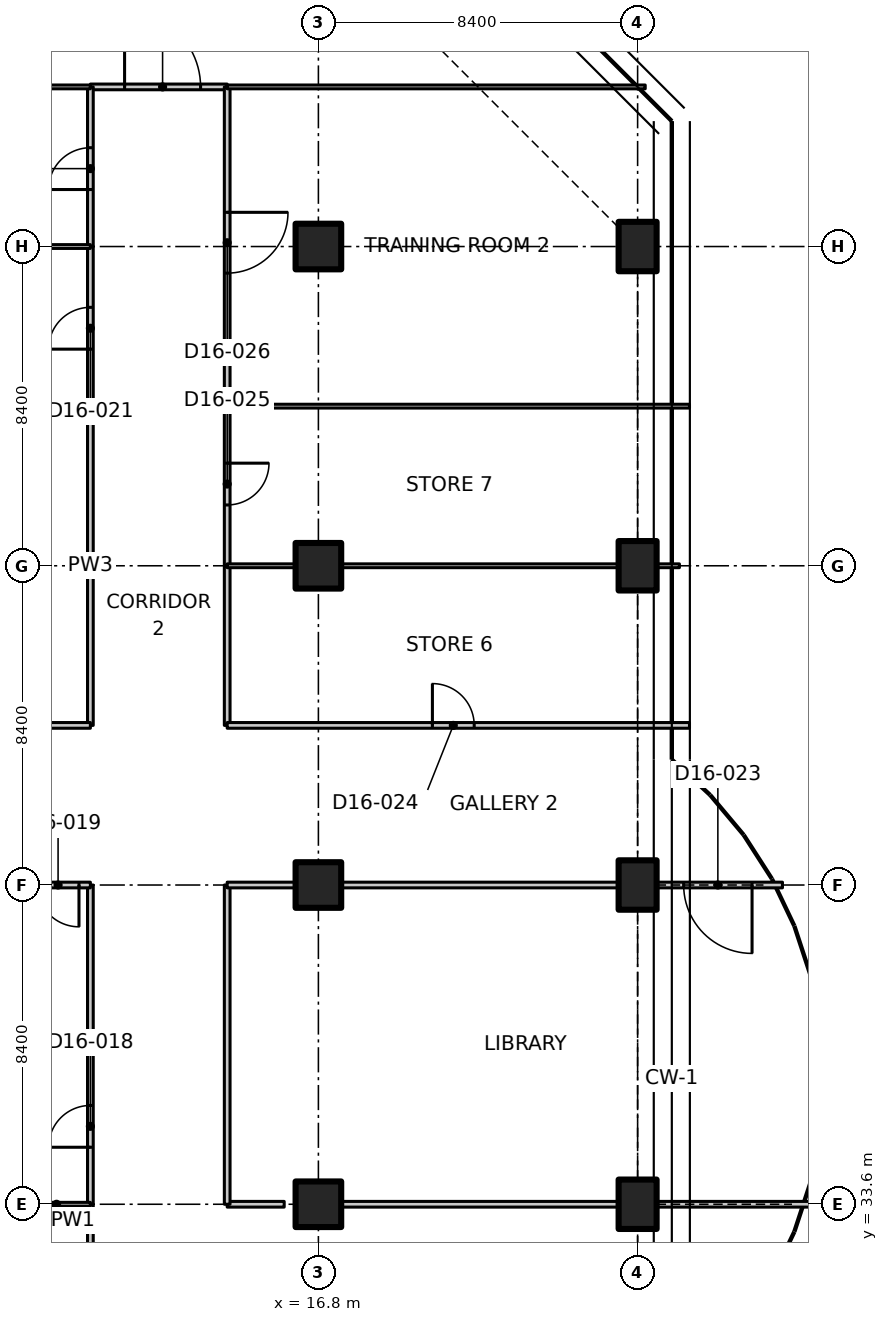
"""IFC4 building model, lengths in metres.
Left out: names, types, materials, properties, quantities, classifications, styles, units other than length and angle.
Written with IfcOpenShell. Run it as: python <this file> out.ifc"""

import sys

from ifc_helpers import new_model, si_unit, direction, frame, frame_2d, origin, origin_2d, place, context, subcontext, project, spatial, polyline, rectangle, outline, extrude, element, fill, save


model = new_model("IFC4")
c1 = context("Model", 3, precision=1e-05, world=origin(), true_north=direction((0.0, 1.0)))
c2 = subcontext(c1, "Body", "Model", "MODEL_VIEW")
j1 = project(units=[si_unit("LENGTHUNIT", "METRE"), si_unit("PLANEANGLEUNIT", "RADIAN")], contexts=[c1])
p1 = place(None, origin())
s1 = spatial("IfcSite", under=j1, at=p1, CompositionType="ELEMENT")
p2 = place(p1, origin())
s2 = spatial("IfcBuilding", under=s1, at=p2, CompositionType="ELEMENT")
p3 = place(p2, frame((0.0, 0.0, 127.7)))
s3 = spatial("IfcBuildingStorey", under=s2, at=p3, CompositionType="ELEMENT", Elevation=127.7)
for number, where, z_axis, x_axis in (
    (1, (16.8, 33.6, 0.0), (0.0, 0.0, 1.0), (1.0, 0.0, 0.0)),
    (2, (16.8, 42.0, 0.0), (0.0, 0.0, 1.0), (1.0, 0.0, 0.0)),
    (3, (16.8, 50.4, 0.0), (0.0, 0.0, 1.0), (1.0, 0.0, 0.0)),
    (4, (16.8, 58.8, 0.0), (0.0, 0.0, 1.0), (1.0, 0.0, 0.0)),
):
    element("IfcColumn", number, at=place(p3, frame(where, z_axis=z_axis, x_axis=x_axis)), inside=s3, PredefinedType="COLUMN", context=c2, shape_type="SweptSolid", body=[
        extrude(rectangle(XDim=1.2, YDim=1.2, at=origin_2d()), origin(), (0.0, 0.0, 1.0), 3.35),
    ])
for number, where, z_axis, x_axis in (
    (5, (25.2, 33.6, 0.0), (0.0, 0.0, 1.0), (1.0, 0.0, 0.0)),
    (6, (25.2, 42.0, 0.0), (0.0, 0.0, 1.0), (1.0, 0.0, 0.0)),
    (7, (25.2, 50.4, 0.0), (0.0, 0.0, 1.0), (1.0, 0.0, 0.0)),
    (8, (25.2, 58.8, 0.0), (0.0, 0.0, 1.0), (1.0, 0.0, 0.0)),
):
    element("IfcColumn", number, at=place(p3, frame(where, z_axis=z_axis, x_axis=x_axis)), inside=s3, PredefinedType="COLUMN", context=c2, shape_type="SweptSolid", body=[
        extrude(rectangle(XDim=1.0, YDim=1.3, at=origin_2d()), origin(), (0.0, 0.0, 1.0), 3.35),
    ])
p4 = place(p3, frame((10.8, 25.2, 0.0), z_axis=(0.0, 0.0, 1.0), x_axis=(0.0, 1.0, 0.0)))
e9 = element("IfcWall", 9, at=p4, inside=s3, PredefinedType="PARTITIONING", context=c2, shape_type="SweptSolid", body=[
    extrude(rectangle(XDim=8.4, YDim=0.15, at=frame_2d((4.2, 0.0))), origin(), (0.0, 0.0, 1.0), 3.33),
])
p5 = place(p4, frame((3.3, 0.0, 0.0)))
e10 = element("IfcOpeningElement", 10, at=p5, cuts=e9, PredefinedType="OPENING", context=c2, shape_type="SweptSolid", body=[
    extrude(rectangle(XDim=1.6, YDim=2.1, at=frame_2d((0.8, 1.05))), frame((0.0, 0.085, 0.0), z_axis=(0.0, -1.0, 0.0), x_axis=(1.0, 0.0, 0.0)), (0.0, 0.0, 1.0), 0.17),
])
p6 = place(p3, frame((14.4, 33.6, 0.0), z_axis=(0.0, 0.0, 1.0), x_axis=(1.0, 0.0, 0.0)))
e11 = element("IfcWall", 11, at=p6, inside=s3, PredefinedType="PARTITIONING", context=c2, shape_type="SweptSolid", body=[
    extrude(rectangle(XDim=1.5, YDim=0.15, at=frame_2d((0.75, 0.0))), origin(), (0.0, 0.0, 1.0), 3.33),
])
p7 = place(p3, frame((17.42, 33.6, 0.0), z_axis=(0.0, 0.0, 1.0), x_axis=(1.0, 0.0, 0.0)))
e12 = element("IfcWall", 12, at=p7, inside=s3, PredefinedType="PARTITIONING", context=c2, shape_type="SweptSolid", body=[
    extrude(rectangle(XDim=7.26, YDim=0.15, at=frame_2d((3.63, 0.0))), origin(), (0.0, 0.0, 1.0), 3.33),
])
p8 = place(p3, frame((25.72, 33.6, 0.0), z_axis=(0.0, 0.0, 1.0), x_axis=(1.0, 0.0, 0.0)))
e13 = element("IfcWall", 13, at=p8, inside=s3, PredefinedType="PARTITIONING", context=c2, shape_type="SweptSolid", body=[
    extrude(rectangle(XDim=4.268, YDim=0.15, at=frame_2d((2.134, 0.0))), origin(), (0.0, 0.0, 1.0), 2.98),
])
p9 = place(p3, frame((10.8, 63.0, 0.0), z_axis=(0.0, 0.0, 1.0), x_axis=(1.0, 0.0, 0.0)))
e14 = element("IfcWall", 14, at=p9, inside=s3, PredefinedType="PARTITIONING", context=c2, shape_type="SweptSolid", body=[
    extrude(rectangle(XDim=3.6, YDim=0.15, at=frame_2d((1.8, 0.0))), origin(), (0.0, 0.0, 1.0), 3.33),
])
p10 = place(p9, frame((0.9, 0.0, 0.0)))
e15 = element("IfcOpeningElement", 15, at=p10, cuts=e14, PredefinedType="OPENING", context=c2, shape_type="SweptSolid", body=[
    extrude(rectangle(XDim=2.0, YDim=2.4, at=frame_2d((1.0, 1.2))), frame((0.0, 0.085, 0.0), z_axis=(0.0, -1.0, 0.0), x_axis=(1.0, 0.0, 0.0)), (0.0, 0.0, 1.0), 0.17),
])
p11 = place(p3, frame((10.8, 33.6, 0.0), z_axis=(0.0, 0.0, 1.0), x_axis=(0.0, 1.0, 0.0)))
e16 = element("IfcWall", 16, at=p11, inside=s3, PredefinedType="PARTITIONING", context=c2, shape_type="SweptSolid", body=[
    extrude(rectangle(XDim=4.2, YDim=0.15, at=frame_2d((2.1, 0.0))), origin(), (0.0, 0.0, 1.0), 3.33),
])
p12 = place(p11, frame((1.5, 0.0, 0.0)))
e17 = element("IfcOpeningElement", 17, at=p12, cuts=e16, PredefinedType="OPENING", context=c2, shape_type="SweptSolid", body=[
    extrude(rectangle(XDim=1.1, YDim=2.1, at=frame_2d((0.55, 1.05))), frame((0.0, 0.085, 0.0), z_axis=(0.0, -1.0, 0.0), x_axis=(1.0, 0.0, 0.0)), (0.0, 0.0, 1.0), 0.17),
])
p13 = place(p3, frame((10.8, 37.8, 0.0), z_axis=(0.0, 0.0, 1.0), x_axis=(0.0, 1.0, 0.0)))
e18 = element("IfcWall", 18, at=p13, inside=s3, PredefinedType="PARTITIONING", context=c2, shape_type="SweptSolid", body=[
    extrude(rectangle(XDim=4.2, YDim=0.15, at=frame_2d((2.1, 0.0))), origin(), (0.0, 0.0, 1.0), 3.33),
])
p14 = place(p3, frame((10.8, 46.2, 0.0), z_axis=(0.0, 0.0, 1.0), x_axis=(0.0, 1.0, 0.0)))
e19 = element("IfcWall", 19, at=p14, inside=s3, PredefinedType="PARTITIONING", context=c2, shape_type="SweptSolid", body=[
    extrude(rectangle(XDim=8.4, YDim=0.15, at=frame_2d((4.2, 0.0))), origin(), (0.0, 0.0, 1.0), 3.33),
])
p15 = place(p3, frame((10.8, 54.6, 0.0), z_axis=(0.0, 0.0, 1.0), x_axis=(0.0, 1.0, 0.0)))
e20 = element("IfcWall", 20, at=p15, inside=s3, PredefinedType="PARTITIONING", context=c2, shape_type="SweptSolid", body=[
    extrude(rectangle(XDim=4.2, YDim=0.15, at=frame_2d((2.1, 0.0))), origin(), (0.0, 0.0, 1.0), 3.33),
])
p16 = place(p15, frame((1.5, 0.0, 0.0)))
e21 = element("IfcOpeningElement", 21, at=p16, cuts=e20, PredefinedType="OPENING", context=c2, shape_type="SweptSolid", body=[
    extrude(rectangle(XDim=1.1, YDim=2.1, at=frame_2d((0.55, 1.05))), frame((0.0, 0.085, 0.0), z_axis=(0.0, -1.0, 0.0), x_axis=(1.0, 0.0, 0.0)), (0.0, 0.0, 1.0), 0.17),
])
p17 = place(p3, frame((10.8, 58.8, 0.0), z_axis=(0.0, 0.0, 1.0), x_axis=(0.0, 1.0, 0.0)))
e22 = element("IfcWall", 22, at=p17, inside=s3, PredefinedType="PARTITIONING", context=c2, shape_type="SweptSolid", body=[
    extrude(rectangle(XDim=4.2, YDim=0.15, at=frame_2d((2.1, 0.0))), origin(), (0.0, 0.0, 1.0), 3.33),
])
p18 = place(p17, frame((1.5, 0.0, 0.0)))
e23 = element("IfcOpeningElement", 23, at=p18, cuts=e22, PredefinedType="OPENING", context=c2, shape_type="SweptSolid", body=[
    extrude(rectangle(XDim=1.1, YDim=2.1, at=frame_2d((0.55, 1.05))), frame((0.0, 0.085, 0.0), z_axis=(0.0, -1.0, 0.0), x_axis=(1.0, 0.0, 0.0)), (0.0, 0.0, 1.0), 0.17),
])
p19 = place(p3, frame((14.4, 42.0, 0.0), z_axis=(0.0, 0.0, 1.0), x_axis=(0.0, -1.0, 0.0)))
e24 = element("IfcWall", 24, at=p19, inside=s3, PredefinedType="PARTITIONING", context=c2, shape_type="SweptSolid", body=[
    extrude(rectangle(XDim=8.4, YDim=0.15, at=frame_2d((4.2, 0.0))), origin(), (0.0, 0.0, 1.0), 3.33),
])
p20 = place(p3, frame((14.4, 50.4, 0.0), z_axis=(0.0, 0.0, 1.0), x_axis=(0.0, -1.0, 0.0)))
e25 = element("IfcWall", 25, at=p20, inside=s3, PredefinedType="PARTITIONING", context=c2, shape_type="SweptSolid", body=[
    extrude(rectangle(XDim=4.2, YDim=0.15, at=frame_2d((2.1, 0.0))), origin(), (0.0, 0.0, 1.0), 3.33),
])
p21 = place(p3, frame((14.4, 54.6, 0.0), z_axis=(0.0, 0.0, 1.0), x_axis=(0.0, -1.0, 0.0)))
e26 = element("IfcWall", 26, at=p21, inside=s3, PredefinedType="PARTITIONING", context=c2, shape_type="SweptSolid", body=[
    extrude(rectangle(XDim=4.2, YDim=0.15, at=frame_2d((2.1, 0.0))), origin(), (0.0, 0.0, 1.0), 3.33),
])
p22 = place(p21, frame((1.5, 0.0, 0.0)))
e27 = element("IfcOpeningElement", 27, at=p22, cuts=e26, PredefinedType="OPENING", context=c2, shape_type="SweptSolid", body=[
    extrude(rectangle(XDim=1.1, YDim=2.1, at=frame_2d((0.55, 1.05))), frame((0.0, 0.085, 0.0), z_axis=(0.0, -1.0, 0.0), x_axis=(1.0, 0.0, 0.0)), (0.0, 0.0, 1.0), 0.17),
])
p23 = place(p3, frame((14.4, 63.0, 0.0), z_axis=(0.0, 0.0, 1.0), x_axis=(0.0, -1.0, 0.0)))
e28 = element("IfcWall", 28, at=p23, inside=s3, PredefinedType="PARTITIONING", context=c2, shape_type="SweptSolid", body=[
    extrude(rectangle(XDim=8.4, YDim=0.15, at=frame_2d((4.2, 0.0))), origin(), (0.0, 0.0, 1.0), 3.33),
])
p24 = place(p23, frame((3.3, 0.0, 0.0)))
e29 = element("IfcOpeningElement", 29, at=p24, cuts=e28, PredefinedType="OPENING", context=c2, shape_type="SweptSolid", body=[
    extrude(rectangle(XDim=1.6, YDim=2.1, at=frame_2d((0.8, 1.05))), frame((0.0, 0.085, 0.0), z_axis=(0.0, -1.0, 0.0), x_axis=(1.0, 0.0, 0.0)), (0.0, 0.0, 1.0), 0.17),
])
p25 = place(p3, frame((10.8, 63.0, 0.0), z_axis=(0.0, 0.0, 1.0), x_axis=(-1.0, 0.0, 0.0)))
e30 = element("IfcWall", 30, at=p25, inside=s3, PredefinedType="PARTITIONING", context=c2, shape_type="SweptSolid", body=[
    extrude(outline(polyline([(0.0, 0.0), (11.0, 0.0), (11.0, 3.33), (7.266, 3.33), (7.264, 2.98), (5.936, 2.98), (5.934, 3.33), (0.0, 3.33), (0.0, 0.0)])), frame((0.0, 0.05, 0.0), z_axis=(0.0, -1.0, 0.0), x_axis=(1.0, 0.0, 0.0)), (0.0, 0.0, 1.0), 0.1),
])
p26 = place(p3, frame((25.4, 63.0, 0.0), z_axis=(0.0, 0.0, 1.0), x_axis=(-1.0, 0.0, 0.0)))
e31 = element("IfcWall", 31, at=p26, inside=s3, PredefinedType="PARTITIONING", context=c2, shape_type="SweptSolid", body=[
    extrude(outline(polyline([(0.0, 0.0), (11.0, 0.0), (11.0, 3.33), (5.066, 3.33), (5.064, 2.98), (3.736, 2.98), (3.734, 3.33), (0.0, 3.33), (0.0, 0.0)])), frame((0.0, 0.05, 0.0), z_axis=(0.0, -1.0, 0.0), x_axis=(1.0, 0.0, 0.0)), (0.0, 0.0, 1.0), 0.1),
])
p27 = place(p3, frame((10.8, 42.0, 0.0), z_axis=(0.0, 0.0, 1.0), x_axis=(-1.0, 0.0, 0.0)))
e32 = element("IfcWall", 32, at=p27, inside=s3, PredefinedType="PARTITIONING", context=c2, shape_type="SweptSolid", body=[
    extrude(rectangle(XDim=1.78, YDim=0.15, at=frame_2d((0.89, 0.0))), origin(), (0.0, 0.0, 1.0), 3.33),
])
p28 = place(p27, frame((0.3, 0.0, 0.0)))
e33 = element("IfcOpeningElement", 33, at=p28, cuts=e32, PredefinedType="OPENING", context=c2, shape_type="SweptSolid", body=[
    extrude(rectangle(XDim=1.1, YDim=2.1, at=frame_2d((0.55, 1.05))), frame((0.0, 0.085, 0.0), z_axis=(0.0, -1.0, 0.0), x_axis=(1.0, 0.0, 0.0)), (0.0, 0.0, 1.0), 0.17),
])
p29 = place(p3, frame((-1.365, 46.2, 0.0), z_axis=(0.0, 0.0, 1.0), x_axis=(1.0, 0.0, 0.0)))
e34 = element("IfcWall", 34, at=p29, inside=s3, PredefinedType="PARTITIONING", context=c2, shape_type="SweptSolid", body=[
    extrude(outline(polyline([(0.0, 0.0), (12.165, 0.0), (12.165, 3.33), (1.815, 3.33), (1.813, 2.98), (0.917, 2.98), (0.915, 3.33), (0.265, 3.33), (0.0, 3.33), (0.0, 0.0)])), frame((0.0, 0.075, 0.0), z_axis=(0.0, -1.0, 0.0), x_axis=(1.0, 0.0, 0.0)), (0.0, 0.0, 1.0), 0.15),
])
p30 = place(p29, frame((5.565, 0.0, 0.0)))
e35 = element("IfcOpeningElement", 35, at=p30, cuts=e34, PredefinedType="OPENING", context=c2, shape_type="SweptSolid", body=[
    extrude(rectangle(XDim=1.6, YDim=2.1, at=frame_2d((0.8, 1.05))), frame((0.0, 0.085, 0.0), z_axis=(0.0, -1.0, 0.0), x_axis=(1.0, 0.0, 0.0)), (0.0, 0.0, 1.0), 0.17),
])
p31 = place(p3, frame((9.02, 33.6, 0.0), z_axis=(0.0, 0.0, 1.0), x_axis=(1.0, 0.0, 0.0)))
e36 = element("IfcWall", 36, at=p31, inside=s3, PredefinedType="PARTITIONING", context=c2, shape_type="SweptSolid", body=[
    extrude(rectangle(XDim=1.78, YDim=0.1, at=frame_2d((0.89, 0.0))), origin(), (0.0, 0.0, 1.0), 3.33),
])
for number, where, z_axis, x_axis in (
    (37, (-1.365, 37.8, 0.0), (0.0, 0.0, 1.0), (1.0, 0.0, 0.0)),
    (38, (-1.365, 54.6, 0.0), (0.0, 0.0, 1.0), (1.0, 0.0, 0.0)),
):
    element("IfcWall", number, at=place(p3, frame(where, z_axis=z_axis, x_axis=x_axis)), inside=s3, PredefinedType="PARTITIONING", context=c2, shape_type="SweptSolid", body=[
        extrude(outline(polyline([(0.0, 0.0), (12.165, 0.0), (12.165, 3.33), (1.815, 3.33), (1.813, 2.98), (0.917, 2.98), (0.915, 3.33), (0.265, 3.33), (0.0, 3.33), (0.0, 0.0)])), frame((0.0, 0.05, 0.0), z_axis=(0.0, -1.0, 0.0), x_axis=(1.0, 0.0, 0.0)), (0.0, 0.0, 1.0), 0.1),
    ])
p32 = place(p3, frame((9.02, 58.8, 0.0), z_axis=(0.0, 0.0, 1.0), x_axis=(1.0, 0.0, 0.0)))
e39 = element("IfcWall", 39, at=p32, inside=s3, PredefinedType="PARTITIONING", context=c2, shape_type="SweptSolid", body=[
    extrude(rectangle(XDim=1.78, YDim=0.1, at=frame_2d((0.89, 0.0))), origin(), (0.0, 0.0, 1.0), 3.33),
])
p33 = place(p3, frame((29.011, 42.0, 0.0), z_axis=(0.0, 0.0, 1.0), x_axis=(-1.0, 0.0, 0.0)))
e40 = element("IfcWall", 40, at=p33, inside=s3, PredefinedType="PARTITIONING", context=c2, shape_type="SweptSolid", body=[
    extrude(rectangle(XDim=3.292, YDim=0.15, at=frame_2d((1.646, 0.0))), origin(), (0.0, 0.0, 1.0), 2.98),
])
p34 = place(p33, frame((0.8, 0.0, 0.0)))
e41 = element("IfcOpeningElement", 41, at=p34, cuts=e40, PredefinedType="OPENING", context=c2, shape_type="SweptSolid", body=[
    extrude(rectangle(XDim=1.8, YDim=2.1, at=frame_2d((0.9, 1.05))), frame((0.0, 0.085, 0.0), z_axis=(0.0, -1.0, 0.0), x_axis=(1.0, 0.0, 0.0)), (0.0, 0.0, 1.0), 0.17),
])
p35 = place(p3, frame((24.68, 42.0, 0.0), z_axis=(0.0, 0.0, 1.0), x_axis=(-1.0, 0.0, 0.0)))
e42 = element("IfcWall", 42, at=p35, inside=s3, PredefinedType="PARTITIONING", context=c2, shape_type="SweptSolid", body=[
    extrude(rectangle(XDim=7.26, YDim=0.15, at=frame_2d((3.63, 0.0))), origin(), (0.0, 0.0, 1.0), 3.33),
])
p36 = place(p3, frame((16.18, 42.0, 0.0), z_axis=(0.0, 0.0, 1.0), x_axis=(-1.0, 0.0, 0.0)))
e43 = element("IfcWall", 43, at=p36, inside=s3, PredefinedType="PARTITIONING", context=c2, shape_type="SweptSolid", body=[
    extrude(rectangle(XDim=1.78, YDim=0.15, at=frame_2d((0.89, 0.0))), origin(), (0.0, 0.0, 1.0), 3.33),
])
p37 = place(p3, frame((14.4, 46.2, 0.0), z_axis=(0.0, 0.0, 1.0), x_axis=(1.0, 0.0, 0.0)))
e44 = element("IfcWall", 44, at=p37, inside=s3, PredefinedType="PARTITIONING", context=c2, shape_type="SweptSolid", body=[
    extrude(outline(polyline([(0.0, 0.0), (12.165, 0.0), (12.165, 3.33), (11.9, 3.33), (11.25, 3.33), (11.248, 2.98), (10.352, 2.98), (10.35, 3.33), (0.0, 3.33), (0.0, 0.0)])), frame((0.0, 0.075, 0.0), z_axis=(0.0, -1.0, 0.0), x_axis=(1.0, 0.0, 0.0)), (0.0, 0.0, 1.0), 0.15),
])
p38 = place(p37, frame((5.4, 0.0, 0.0)))
e45 = element("IfcOpeningElement", 45, at=p38, cuts=e44, PredefinedType="OPENING", context=c2, shape_type="SweptSolid", body=[
    extrude(rectangle(XDim=1.1, YDim=2.1, at=frame_2d((0.55, 1.05))), frame((0.0, 0.085, 0.0), z_axis=(0.0, -1.0, 0.0), x_axis=(1.0, 0.0, 0.0)), (0.0, 0.0, 1.0), 0.17),
])
p39 = place(p3, frame((14.4, 50.4, 0.0), z_axis=(0.0, 0.0, 1.0), x_axis=(1.0, 0.0, 0.0)))
e46 = element("IfcWall", 46, at=p39, inside=s3, PredefinedType="PARTITIONING", context=c2, shape_type="SweptSolid", body=[
    extrude(rectangle(XDim=1.78, YDim=0.1, at=frame_2d((0.89, 0.0))), origin(), (0.0, 0.0, 1.0), 3.33),
])
p40 = place(p3, frame((17.42, 50.4, 0.0), z_axis=(0.0, 0.0, 1.0), x_axis=(1.0, 0.0, 0.0)))
e47 = element("IfcWall", 47, at=p40, inside=s3, PredefinedType="PARTITIONING", context=c2, shape_type="SweptSolid", body=[
    extrude(rectangle(XDim=7.26, YDim=0.1, at=frame_2d((3.63, 0.0))), origin(), (0.0, 0.0, 1.0), 3.33),
])
p41 = place(p3, frame((25.72, 50.4, 0.0), z_axis=(0.0, 0.0, 1.0), x_axis=(1.0, 0.0, 0.0)))
e48 = element("IfcWall", 48, at=p41, inside=s3, PredefinedType="PARTITIONING", context=c2, shape_type="SweptSolid", body=[
    extrude(rectangle(XDim=0.58, YDim=0.1, at=frame_2d((0.29, 0.0))), origin(), (0.0, 0.0, 1.0), 3.33),
])
p42 = place(p3, frame((14.4, 54.6, 0.0), z_axis=(0.0, 0.0, 1.0), x_axis=(1.0, 0.0, 0.0)))
e49 = element("IfcWall", 49, at=p42, inside=s3, PredefinedType="PARTITIONING", context=c2, shape_type="SweptSolid", body=[
    extrude(outline(polyline([(0.0, 0.0), (12.165, 0.0), (12.165, 3.33), (11.9, 3.33), (11.25, 3.33), (11.248, 2.98), (10.352, 2.98), (10.35, 3.33), (0.0, 3.33), (0.0, 0.0)])), frame((0.0, 0.05, 0.0), z_axis=(0.0, -1.0, 0.0), x_axis=(1.0, 0.0, 0.0)), (0.0, 0.0, 1.0), 0.1),
])
p43 = place(p10, origin())
e50 = element("IfcDoor", 50, at=p43, inside=s3, OperationType="DOUBLE_DOOR_SINGLE_SWING", PredefinedType="DOOR", context=c2, shape_type="SweptSolid", body=[
    extrude(rectangle(XDim=2.0, YDim=2.4, at=frame_2d((1.0, 1.2))), frame((0.0, 0.025, 0.0), z_axis=(0.0, -1.0, 0.0), x_axis=(1.0, 0.0, 0.0)), (0.0, 0.0, 1.0), 0.05),
])
fill(e15, e50)
p44 = place(p12, origin())
e51 = element("IfcDoor", 51, at=p44, inside=s3, OperationType="SINGLE_SWING_LEFT", PredefinedType="DOOR", context=c2, shape_type="SweptSolid", body=[
    extrude(rectangle(XDim=1.1, YDim=2.1, at=frame_2d((0.55, 1.05))), frame((0.0, 0.025, 0.0), z_axis=(0.0, -1.0, 0.0), x_axis=(1.0, 0.0, 0.0)), (0.0, 0.0, 1.0), 0.05),
])
fill(e17, e51)
p45 = place(p28, origin())
e52 = element("IfcDoor", 52, at=p45, inside=s3, OperationType="SINGLE_SWING_LEFT", PredefinedType="DOOR", context=c2, shape_type="SweptSolid", body=[
    extrude(rectangle(XDim=1.1, YDim=2.1, at=frame_2d((0.55, 1.05))), frame((0.0, 0.025, 0.0), z_axis=(0.0, -1.0, 0.0), x_axis=(1.0, 0.0, 0.0)), (0.0, 0.0, 1.0), 0.05),
])
fill(e33, e52)
p46 = place(p16, origin())
e53 = element("IfcDoor", 53, at=p46, inside=s3, OperationType="SINGLE_SWING_LEFT", PredefinedType="DOOR", context=c2, shape_type="SweptSolid", body=[
    extrude(rectangle(XDim=1.1, YDim=2.1, at=frame_2d((0.55, 1.05))), frame((0.0, 0.025, 0.0), z_axis=(0.0, -1.0, 0.0), x_axis=(1.0, 0.0, 0.0)), (0.0, 0.0, 1.0), 0.05),
])
fill(e21, e53)
p47 = place(p18, origin())
e54 = element("IfcDoor", 54, at=p47, inside=s3, OperationType="SINGLE_SWING_LEFT", PredefinedType="DOOR", context=c2, shape_type="SweptSolid", body=[
    extrude(rectangle(XDim=1.1, YDim=2.1, at=frame_2d((0.55, 1.05))), frame((0.0, 0.025, 0.0), z_axis=(0.0, -1.0, 0.0), x_axis=(1.0, 0.0, 0.0)), (0.0, 0.0, 1.0), 0.05),
])
fill(e23, e54)
p48 = place(p34, origin())
e55 = element("IfcDoor", 55, at=p48, inside=s3, OperationType="DOUBLE_DOOR_SINGLE_SWING", PredefinedType="DOOR", context=c2, shape_type="SweptSolid", body=[
    extrude(rectangle(XDim=1.8, YDim=2.1, at=frame_2d((0.9, 1.05))), frame((0.0, 0.025, 0.0), z_axis=(0.0, -1.0, 0.0), x_axis=(1.0, 0.0, 0.0)), (0.0, 0.0, 1.0), 0.05),
])
fill(e41, e55)
p49 = place(p38, origin())
e56 = element("IfcDoor", 56, at=p49, inside=s3, OperationType="SINGLE_SWING_LEFT", PredefinedType="DOOR", context=c2, shape_type="SweptSolid", body=[
    extrude(rectangle(XDim=1.1, YDim=2.1, at=frame_2d((0.55, 1.05))), frame((0.0, 0.025, 0.0), z_axis=(0.0, -1.0, 0.0), x_axis=(1.0, 0.0, 0.0)), (0.0, 0.0, 1.0), 0.05),
])
fill(e45, e56)
p50 = place(p22, origin())
e57 = element("IfcDoor", 57, at=p50, inside=s3, OperationType="SINGLE_SWING_LEFT", PredefinedType="DOOR", context=c2, shape_type="SweptSolid", body=[
    extrude(rectangle(XDim=1.1, YDim=2.1, at=frame_2d((0.55, 1.05))), frame((0.0, 0.025, 0.0), z_axis=(0.0, -1.0, 0.0), x_axis=(1.0, 0.0, 0.0)), (0.0, 0.0, 1.0), 0.05),
])
fill(e27, e57)
p51 = place(p24, origin())
e58 = element("IfcDoor", 58, at=p51, inside=s3, OperationType="DOUBLE_DOOR_SINGLE_SWING", PredefinedType="DOOR", context=c2, shape_type="SweptSolid", body=[
    extrude(rectangle(XDim=1.6, YDim=2.1, at=frame_2d((0.8, 1.05))), frame((0.0, 0.025, 0.0), z_axis=(0.0, -1.0, 0.0), x_axis=(1.0, 0.0, 0.0)), (0.0, 0.0, 1.0), 0.05),
])
fill(e29, e58)
save(model, sys.argv[1])
